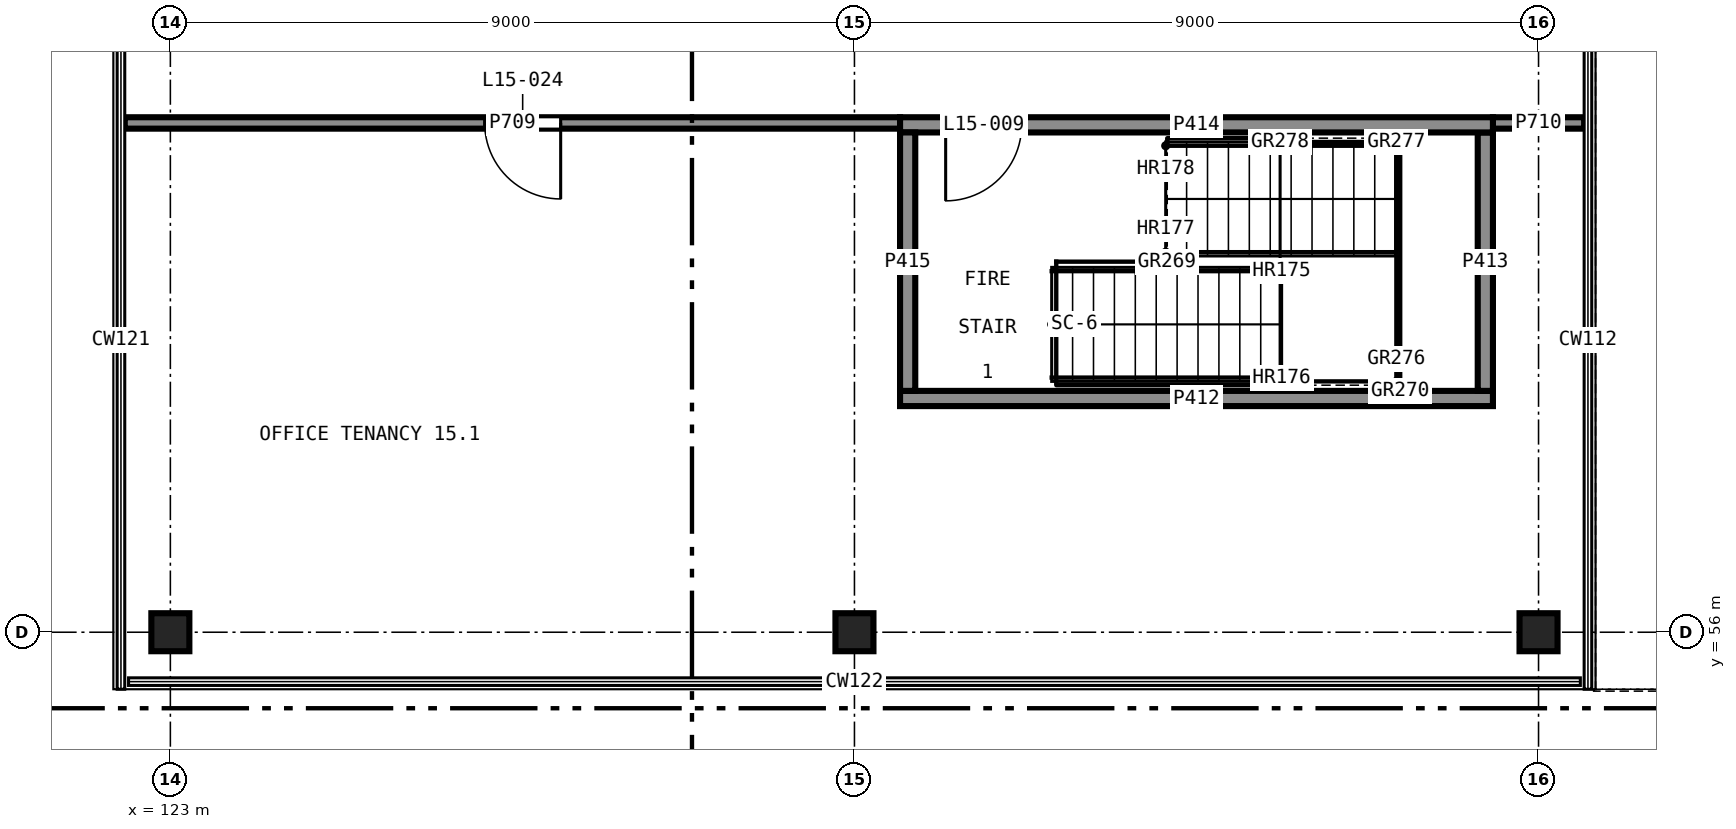
"""IFC4 building model, lengths in metres.
Left out: names, types, materials, properties, quantities, classifications, styles, units other than length and angle.
Written with IfcOpenShell. Run it as: python <this file> out.ifc"""

import sys

from ifc_helpers import new_model, si_unit, direction, frame, frame_2d, origin, origin_2d, place, context, subcontext, project, spatial, rectangle, extrude, element, fill, save


model = new_model("IFC4")
c1 = context("Model", 3, precision=1e-05, world=origin(), true_north=direction((0.0, 1.0)))
c2 = subcontext(c1, "Body", "Model", "MODEL_VIEW")
j1 = project(units=[si_unit("LENGTHUNIT", "METRE"), si_unit("PLANEANGLEUNIT", "RADIAN")], contexts=[c1])
p1 = place(None, origin())
s1 = spatial("IfcSite", under=j1, at=p1, CompositionType="ELEMENT")
p2 = place(p1, origin())
s2 = spatial("IfcBuilding", under=s1, at=p2, CompositionType="ELEMENT")
p3 = place(p2, frame((0.0, 0.0, 61.5)))
s3 = spatial("IfcBuildingStorey", under=s2, at=p3, CompositionType="ELEMENT", Elevation=61.5)
for number, where, z_axis, x_axis in (
    (1, (123.0, 56.0, 0.0), (0.0, 0.0, 1.0), (1.0, 0.0, 0.0)),
    (2, (132.0, 56.0, 0.0), (0.0, 0.0, 1.0), (1.0, 0.0, 0.0)),
    (3, (141.0, 56.0, 0.0), (0.0, 0.0, 1.0), (1.0, 0.0, 0.0)),
):
    element("IfcColumn", number, at=place(p3, frame(where, z_axis=z_axis, x_axis=x_axis)), inside=s3, PredefinedType="COLUMN", context=c2, shape_type="SweptSolid", body=[
        extrude(rectangle(XDim=0.5, YDim=0.5, at=origin_2d()), origin(), (0.0, 0.0, 1.0), 4.0),
    ])
p4 = place(p3, frame((132.6, 59.075, 0.0), z_axis=(0.0, 0.0, 1.0), x_axis=(1.0, 0.0, 0.0)))
e4 = element("IfcWall", 4, at=p4, inside=s3, PredefinedType="SHEAR", context=c2, shape_type="SweptSolid", body=[
    extrude(rectangle(XDim=7.8, YDim=0.2, at=frame_2d((3.9, 0.0))), origin(), (0.0, 0.0, 1.0), 3.58),
])
p5 = place(p3, frame((140.3, 59.175, 0.0), z_axis=(0.0, 0.0, 1.0), x_axis=(0.0, 1.0, 0.0)))
e5 = element("IfcWall", 5, at=p5, inside=s3, PredefinedType="SHEAR", context=c2, shape_type="SweptSolid", body=[
    extrude(rectangle(XDim=3.4, YDim=0.2, at=frame_2d((1.7, 0.0))), origin(), (0.0, 0.0, 1.0), 3.58),
])
p6 = place(p3, frame((140.4, 62.675, 0.0), z_axis=(0.0, 0.0, 1.0), x_axis=(-1.0, 0.0, 0.0)))
e6 = element("IfcWall", 6, at=p6, inside=s3, PredefinedType="SHEAR", context=c2, shape_type="SweptSolid", body=[
    extrude(rectangle(XDim=7.8, YDim=0.2, at=frame_2d((3.9, 0.0))), origin(), (0.0, 0.0, 1.0), 3.58),
])
p7 = place(p6, frame((6.2, 0.0, 0.0)))
e7 = element("IfcOpeningElement", 7, at=p7, cuts=e6, PredefinedType="OPENING", context=c2, shape_type="SweptSolid", body=[
    extrude(rectangle(XDim=1.0, YDim=2.1, at=frame_2d((0.5, 1.05))), frame((0.0, 0.11, 0.0), z_axis=(0.0, -1.0, 0.0), x_axis=(1.0, 0.0, 0.0)), (0.0, 0.0, 1.0), 0.22),
])
p8 = place(p3, frame((132.7, 62.575, 0.0), z_axis=(0.0, 0.0, 1.0), x_axis=(0.0, -1.0, 0.0)))
e8 = element("IfcWall", 8, at=p8, inside=s3, PredefinedType="SHEAR", context=c2, shape_type="SweptSolid", body=[
    extrude(rectangle(XDim=3.4, YDim=0.2, at=frame_2d((1.7, 0.0))), origin(), (0.0, 0.0, 1.0), 3.58),
])
p9 = place(p3, frame((132.6, 62.7, 0.0), z_axis=(0.0, 0.0, 1.0), x_axis=(-1.0, 0.0, 0.0)))
e9 = element("IfcWall", 9, at=p9, inside=s3, PredefinedType="PARTITIONING", context=c2, shape_type="SweptSolid", body=[
    extrude(rectangle(XDim=10.2, YDim=0.15, at=frame_2d((5.1, 0.0))), origin(), (0.0, 0.0, 1.0), 3.58),
])
p10 = place(p9, frame((4.465, 0.0, 0.0)))
e10 = element("IfcOpeningElement", 10, at=p10, cuts=e9, PredefinedType="OPENING", context=c2, shape_type="SweptSolid", body=[
    extrude(rectangle(XDim=1.0, YDim=2.1, at=frame_2d((0.5, 1.05))), frame((0.0, 0.085, 0.0), z_axis=(0.0, -1.0, 0.0), x_axis=(1.0, 0.0, 0.0)), (0.0, 0.0, 1.0), 0.17),
])
p11 = place(p3, frame((141.6, 62.7, 0.0), z_axis=(0.0, 0.0, 1.0), x_axis=(-1.0, 0.0, 0.0)))
e11 = element("IfcWall", 11, at=p11, inside=s3, PredefinedType="PARTITIONING", context=c2, shape_type="SweptSolid", body=[
    extrude(rectangle(XDim=1.2, YDim=0.15, at=frame_2d((0.6, 0.0))), origin(), (0.0, 0.0, 1.0), 3.58),
])
p12 = place(p7, origin())
e12 = element("IfcDoor", 12, at=p12, inside=s3, OperationType="SINGLE_SWING_LEFT", PredefinedType="DOOR", context=c2, shape_type="SweptSolid", body=[
    extrude(rectangle(XDim=1.0, YDim=2.1, at=frame_2d((0.5, 1.05))), frame((0.0, 0.025, 0.0), z_axis=(0.0, -1.0, 0.0), x_axis=(1.0, 0.0, 0.0)), (0.0, 0.0, 1.0), 0.05),
])
fill(e7, e12)
p13 = place(p10, origin())
e13 = element("IfcDoor", 13, at=p13, inside=s3, OperationType="SINGLE_SWING_RIGHT", PredefinedType="DOOR", context=c2, shape_type="SweptSolid", body=[
    extrude(rectangle(XDim=1.0, YDim=2.1, at=frame_2d((0.5, 1.05))), frame((0.0, 0.025, 0.0), z_axis=(0.0, -1.0, 0.0), x_axis=(1.0, 0.0, 0.0)), (0.0, 0.0, 1.0), 0.05),
])
fill(e10, e13)
save(model, sys.argv[1])
